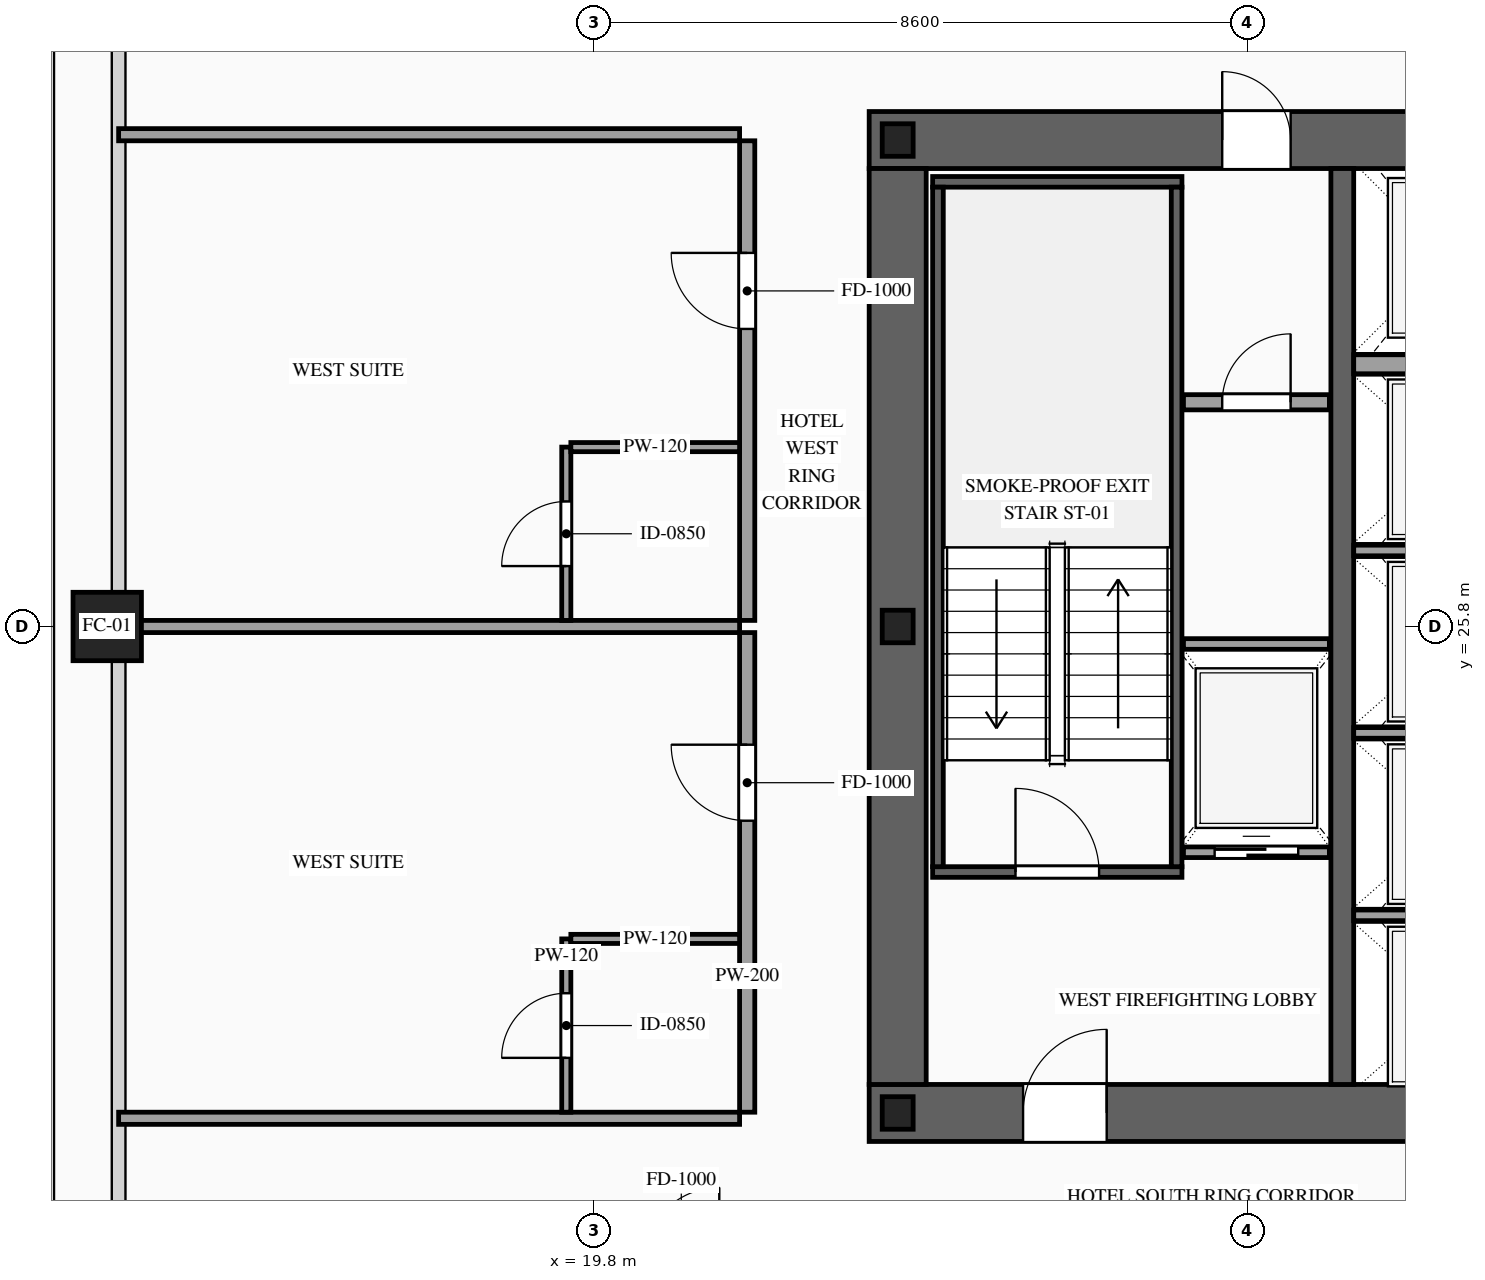
"""IFC4 building model, lengths in metres.
Left out: names, types, materials, properties, quantities, classifications, styles, units other than length and angle.
Written with IfcOpenShell. Run it as: python <this file> out.ifc"""

import sys

from ifc_helpers import new_model, si_unit, direction, frame, frame_2d, origin, origin_2d, place, context, subcontext, project, spatial, rectangle, hollow_rectangle, i_section, extrude, source, transform, mapped, element, fill, save


model = new_model("IFC4")
c1 = context("Model", 3, precision=1e-05, world=origin(), true_north=direction((0.0, 1.0)))
c2 = subcontext(c1, "Body", "Model", "MODEL_VIEW")
j1 = project(units=[si_unit("LENGTHUNIT", "METRE"), si_unit("PLANEANGLEUNIT", "RADIAN")], contexts=[c1])
p1 = place(None, origin())
s1 = spatial("IfcSite", under=j1, at=p1, CompositionType="ELEMENT")
p2 = place(p1, origin())
s2 = spatial("IfcBuilding", under=s1, at=p2, CompositionType="ELEMENT")
p3 = place(p2, frame((0.0, 0.0, 97.4)))
s3 = spatial("IfcBuildingStorey", under=s2, at=p3, CompositionType="ELEMENT", Elevation=97.4)
p4 = place(p3, frame((23.425, 19.4, 0.0), z_axis=(0.0, 0.0, 1.0), x_axis=(1.0, 0.0, 0.0)))
e1 = element("IfcWall", 1, at=p4, inside=s3, PredefinedType="SHEAR", context=c2, shape_type="SweptSolid", body=[
    extrude(rectangle(XDim=27.15, YDim=0.75, at=frame_2d((13.575, 0.0))), origin(), (0.0, 0.0, 1.0), 3.6),
])
p5 = place(p4, frame((2.025, 0.0, 0.0)))
e2 = element("IfcOpeningElement", 2, at=p5, cuts=e1, PredefinedType="OPENING", context=c2, shape_type="SweptSolid", body=[
    extrude(rectangle(XDim=1.1, YDim=2.2, at=frame_2d((0.55, 1.1))), frame((0.0, 0.39, 0.0), z_axis=(0.0, -1.0, 0.0), x_axis=(1.0, 0.0, 0.0)), (0.0, 0.0, 1.0), 0.78),
])
p6 = place(p4, frame((9.925, 0.0, 0.0)))
e3 = element("IfcOpeningElement", 3, at=p6, cuts=e1, PredefinedType="OPENING", context=c2, shape_type="SweptSolid", body=[
    extrude(rectangle(XDim=1.1, YDim=2.2, at=frame_2d((0.55, 1.1))), frame((0.0, 0.39, 0.0), z_axis=(0.0, -1.0, 0.0), x_axis=(1.0, 0.0, 0.0)), (0.0, 0.0, 1.0), 0.78),
])
p7 = place(p4, frame((23.125, 0.0, 0.0)))
e4 = element("IfcOpeningElement", 4, at=p7, cuts=e1, PredefinedType="OPENING", context=c2, shape_type="SweptSolid", body=[
    extrude(rectangle(XDim=1.1, YDim=2.2, at=frame_2d((0.55, 1.1))), frame((0.0, 0.39, 0.0), z_axis=(0.0, -1.0, 0.0), x_axis=(1.0, 0.0, 0.0)), (0.0, 0.0, 1.0), 0.78),
])
p8 = place(p4, frame((19.745, 0.0, 0.0)))
e5 = element("IfcOpeningElement", 5, at=p8, cuts=e1, PredefinedType="OPENING", context=c2, shape_type="SweptSolid", body=[
    extrude(rectangle(XDim=0.9, YDim=2.15, at=frame_2d((0.45, 1.075))), frame((0.0, 0.39, 0.0), z_axis=(0.0, -1.0, 0.0), x_axis=(1.0, 0.0, 0.0)), (0.0, 0.0, 1.0), 0.78),
])
p9 = place(p4, frame((18.305, 0.0, 0.0)))
e6 = element("IfcOpeningElement", 6, at=p9, cuts=e1, PredefinedType="OPENING", context=c2, shape_type="SweptSolid", body=[
    extrude(rectangle(XDim=0.9, YDim=2.15, at=frame_2d((0.45, 1.075))), frame((0.0, 0.39, 0.0), z_axis=(0.0, -1.0, 0.0), x_axis=(1.0, 0.0, 0.0)), (0.0, 0.0, 1.0), 0.78),
])
p10 = place(p3, frame((23.425, 32.2, 0.0), z_axis=(0.0, 0.0, 1.0), x_axis=(1.0, 0.0, 0.0)))
e7 = element("IfcWall", 7, at=p10, inside=s3, PredefinedType="SHEAR", context=c2, shape_type="SweptSolid", body=[
    extrude(rectangle(XDim=27.15, YDim=0.75, at=frame_2d((13.575, 0.0))), origin(), (0.0, 0.0, 1.0), 3.6),
])
p11 = place(p10, frame((4.645, 0.0, 0.0)))
e8 = element("IfcOpeningElement", 8, at=p11, cuts=e7, PredefinedType="OPENING", context=c2, shape_type="SweptSolid", body=[
    extrude(rectangle(XDim=0.9, YDim=2.15, at=frame_2d((0.45, 1.075))), frame((0.0, 0.39, 0.0), z_axis=(0.0, -1.0, 0.0), x_axis=(1.0, 0.0, 0.0)), (0.0, 0.0, 1.0), 0.78),
])
p12 = place(p10, frame((9.925, 0.0, 0.0)))
e9 = element("IfcOpeningElement", 9, at=p12, cuts=e7, PredefinedType="OPENING", context=c2, shape_type="SweptSolid", body=[
    extrude(rectangle(XDim=1.1, YDim=2.2, at=frame_2d((0.55, 1.1))), frame((0.0, 0.39, 0.0), z_axis=(0.0, -1.0, 0.0), x_axis=(1.0, 0.0, 0.0)), (0.0, 0.0, 1.0), 0.78),
])
p13 = place(p10, frame((15.775, 0.0, 0.0)))
e10 = element("IfcOpeningElement", 10, at=p13, cuts=e7, PredefinedType="OPENING", context=c2, shape_type="SweptSolid", body=[
    extrude(rectangle(XDim=1.1, YDim=2.2, at=frame_2d((0.55, 1.1))), frame((0.0, 0.39, 0.0), z_axis=(0.0, -1.0, 0.0), x_axis=(1.0, 0.0, 0.0)), (0.0, 0.0, 1.0), 0.78),
])
p14 = place(p10, frame((18.975, 0.0, 0.0)))
e11 = element("IfcOpeningElement", 11, at=p14, cuts=e7, PredefinedType="OPENING", context=c2, shape_type="SweptSolid", body=[
    extrude(rectangle(XDim=0.9, YDim=2.15, at=frame_2d((0.45, 1.075))), frame((0.0, 0.39, 0.0), z_axis=(0.0, -1.0, 0.0), x_axis=(1.0, 0.0, 0.0)), (0.0, 0.0, 1.0), 0.78),
])
m1 = source(origin(), c2, "Body", "SweptSolid", [
    extrude(rectangle(XDim=12.05, YDim=0.75, at=frame_2d((6.025, 0.0))), origin(), (0.0, 0.0, 1.0), 3.6),
])
p15 = place(p3, frame((23.8, 19.775, 0.0), z_axis=(0.0, 0.0, 1.0), x_axis=(0.0, 1.0, 0.0)))
e12 = element("IfcWall", 12, at=p15, inside=s3, PredefinedType="SHEAR", context=c2, shape_type="MappedRepresentation", body=[
    mapped(m1, transform((0.0, 0.0, 0.0), scale=1.0)),
])
m2 = source(origin(), c2, "Body", "SweptSolid", [
    extrude(rectangle(XDim=12.05, YDim=0.3, at=frame_2d((6.025, 0.0))), origin(), (0.0, 0.0, 1.0), 3.6),
])
p16 = place(p3, frame((29.65, 19.775, 0.0), z_axis=(0.0, 0.0, 1.0), x_axis=(0.0, 1.0, 0.0)))
e13 = element("IfcWall", 13, at=p16, inside=s3, PredefinedType="SOLIDWALL", context=c2, shape_type="MappedRepresentation", body=[
    mapped(m2, transform((0.0, 0.0, 0.0), scale=1.0)),
])
m3 = source(origin(), c2, "Body", "SweptSolid", [
    extrude(i_section(OverallWidth=0.407, OverallDepth=0.428, WebThickness=0.02, FlangeThickness=0.035, at=origin_2d()), origin(), (0.0, 0.0, 1.0), 3.6),
])
for number, where, z_axis, x_axis in (
    (14, (23.8, 19.4, 0.0), (0.0, 0.0, 1.0), (1.0, 0.0, 0.0)),
    (15, (23.8, 25.8, 0.0), (0.0, 0.0, 1.0), (1.0, 0.0, 0.0)),
    (16, (23.8, 32.2, 0.0), (0.0, 0.0, 1.0), (1.0, 0.0, 0.0)),
):
    element("IfcColumn", number, at=place(p3, frame(where, z_axis=z_axis, x_axis=x_axis)), inside=s3, PredefinedType="COLUMN", context=c2, shape_type="MappedRepresentation", body=[
        mapped(m3, transform((0.0, 0.0, 0.0), scale=1.0)),
    ])
m4 = source(origin(), c2, "Body", "SweptSolid", [
    extrude(hollow_rectangle(XDim=0.9, YDim=0.9, WallThickness=0.042, at=origin_2d()), origin(), (0.0, 0.0, 1.0), 3.6),
])
p17 = place(p3, frame((13.4, 25.8, 0.0), z_axis=(0.0, 0.0, 1.0), x_axis=(1.0, 0.0, 0.0)))
e17 = element("IfcColumn", 17, at=p17, inside=s3, PredefinedType="COLUMN", context=c2, shape_type="MappedRepresentation", body=[
    mapped(m4, transform((0.0, 0.0, 0.0), scale=1.0)),
])
p18 = place(p3, frame((27.56, 22.83, 0.0), z_axis=(0.0, 0.0, 1.0), x_axis=(1.0, 0.0, 0.0)))
e18 = element("IfcWall", 18, at=p18, inside=s3, PredefinedType="SOLIDWALL", context=c2, shape_type="SweptSolid", body=[
    extrude(rectangle(XDim=1.92, YDim=0.14, at=frame_2d((0.96, 0.0))), origin(), (0.0, 0.0, 1.0), 3.38),
])
p19 = place(p18, frame((0.41, 0.0, 0.0)))
e19 = element("IfcOpeningElement", 19, at=p19, cuts=e18, PredefinedType="OPENING", context=c2, shape_type="SweptSolid", body=[
    extrude(rectangle(XDim=1.1, YDim=2.2, at=frame_2d((0.55, 1.1))), frame((0.0, 0.085, 0.0), z_axis=(0.0, -1.0, 0.0), x_axis=(1.0, 0.0, 0.0)), (0.0, 0.0, 1.0), 0.17),
])
m5 = source(origin(), c2, "Body", "SweptSolid", [
    extrude(rectangle(XDim=1.92, YDim=0.14, at=frame_2d((0.96, 0.0))), origin(), (0.0, 0.0, 1.0), 3.38),
])
p20 = place(p3, frame((27.56, 25.57, 0.0), z_axis=(0.0, 0.0, 1.0), x_axis=(1.0, 0.0, 0.0)))
e20 = element("IfcWall", 20, at=p20, inside=s3, PredefinedType="SOLIDWALL", context=c2, shape_type="MappedRepresentation", body=[
    mapped(m5, transform((0.0, 0.0, 0.0), scale=1.0)),
])
m6 = source(origin(), c2, "Body", "SweptSolid", [
    extrude(rectangle(XDim=2.5, YDim=0.14, at=frame_2d((1.25, 0.0))), origin(), (0.0, 0.0, 1.0), 3.38),
])
for number, where, z_axis, x_axis in (
    (21, (29.8, 22.0, 0.0), (0.0, 0.0, 1.0), (1.0, 0.0, 0.0)),
    (22, (29.8, 24.4, 0.0), (0.0, 0.0, 1.0), (1.0, 0.0, 0.0)),
    (23, (29.8, 26.8, 0.0), (0.0, 0.0, 1.0), (1.0, 0.0, 0.0)),
):
    element("IfcWall", number, at=place(p3, frame(where, z_axis=z_axis, x_axis=x_axis)), inside=s3, PredefinedType="SOLIDWALL", context=c2, shape_type="MappedRepresentation", body=[
        mapped(m6, transform((0.0, 0.0, 0.0), scale=1.0)),
    ])
m7 = source(origin(), c2, "Body", "SweptSolid", [
    extrude(rectangle(XDim=2.5, YDim=0.25, at=frame_2d((1.25, 0.0))), origin(), (0.0, 0.0, 1.0), 3.38),
])
p21 = place(p3, frame((29.8, 29.25, 0.0), z_axis=(0.0, 0.0, 1.0), x_axis=(1.0, 0.0, 0.0)))
e24 = element("IfcWall", 24, at=p21, inside=s3, PredefinedType="SOLIDWALL", context=c2, shape_type="MappedRepresentation", body=[
    mapped(m7, transform((0.0, 0.0, 0.0), scale=1.0)),
])
p22 = place(p3, frame((24.26, 22.57, 0.0), z_axis=(0.0, 0.0, 1.0), x_axis=(1.0, 0.0, 0.0)))
e25 = element("IfcWall", 25, at=p22, inside=s3, PredefinedType="SOLIDWALL", context=c2, shape_type="SweptSolid", body=[
    extrude(rectangle(XDim=3.28, YDim=0.14, at=frame_2d((1.64, 0.0))), origin(), (0.0, 0.0, 1.0), 3.38),
])
p23 = place(p22, frame((1.09, 0.0, 0.0)))
e26 = element("IfcOpeningElement", 26, at=p23, cuts=e25, PredefinedType="OPENING", context=c2, shape_type="SweptSolid", body=[
    extrude(rectangle(XDim=1.1, YDim=2.2, at=frame_2d((0.55, 1.1))), frame((0.0, 0.085, 0.0), z_axis=(0.0, -1.0, 0.0), x_axis=(1.0, 0.0, 0.0)), (0.0, 0.0, 1.0), 0.17),
])
m8 = source(origin(), c2, "Body", "SweptSolid", [
    extrude(rectangle(XDim=3.28, YDim=0.14, at=frame_2d((1.64, 0.0))), origin(), (0.0, 0.0, 1.0), 3.38),
])
p24 = place(p3, frame((24.26, 31.65, 0.0), z_axis=(0.0, 0.0, 1.0), x_axis=(1.0, 0.0, 0.0)))
e27 = element("IfcWall", 27, at=p24, inside=s3, PredefinedType="SOLIDWALL", context=c2, shape_type="MappedRepresentation", body=[
    mapped(m8, transform((0.0, 0.0, 0.0), scale=1.0)),
])
m9 = source(origin(), c2, "Body", "SweptSolid", [
    extrude(rectangle(XDim=8.94, YDim=0.14, at=frame_2d((4.47, 0.0))), origin(), (0.0, 0.0, 1.0), 3.38),
])
for number, where, z_axis, x_axis in (
    (28, (24.33, 22.64, 0.0), (0.0, 0.0, 1.0), (0.0, 1.0, 0.0)),
    (29, (27.47, 22.64, 0.0), (0.0, 0.0, 1.0), (0.0, 1.0, 0.0)),
):
    element("IfcWall", number, at=place(p3, frame(where, z_axis=z_axis, x_axis=x_axis)), inside=s3, PredefinedType="SOLIDWALL", context=c2, shape_type="MappedRepresentation", body=[
        mapped(m9, transform((0.0, 0.0, 0.0), scale=1.0)),
    ])
p25 = place(p3, frame((27.56, 28.75, 0.0), z_axis=(0.0, 0.0, 1.0), x_axis=(1.0, 0.0, 0.0)))
e30 = element("IfcWall", 30, at=p25, inside=s3, PredefinedType="PARTITIONING", context=c2, shape_type="SweptSolid", body=[
    extrude(rectangle(XDim=1.92, YDim=0.2, at=frame_2d((0.96, 0.0))), origin(), (0.0, 0.0, 1.0), 3.38),
])
p26 = place(p25, frame((0.51, 0.0, 0.0)))
e31 = element("IfcOpeningElement", 31, at=p26, cuts=e30, PredefinedType="OPENING", context=c2, shape_type="SweptSolid", body=[
    extrude(rectangle(XDim=0.9, YDim=2.15, at=frame_2d((0.45, 1.075))), frame((0.0, 0.115, 0.0), z_axis=(0.0, -1.0, 0.0), x_axis=(1.0, 0.0, 0.0)), (0.0, 0.0, 1.0), 0.23),
])
p27 = place(p3, frame((21.82, 19.41, 0.0), z_axis=(0.0, 0.0, 1.0), x_axis=(0.0, 1.0, 0.0)))
e32 = element("IfcWall", 32, at=p27, inside=s3, PredefinedType="PARTITIONING", context=c2, shape_type="SweptSolid", body=[
    extrude(rectangle(XDim=6.31, YDim=0.2, at=frame_2d((3.155, 0.0))), origin(), (0.0, 0.0, 1.0), 3.38),
])
p28 = place(p27, frame((3.835, 0.0, 0.0)))
e33 = element("IfcOpeningElement", 33, at=p28, cuts=e32, PredefinedType="OPENING", context=c2, shape_type="SweptSolid", body=[
    extrude(rectangle(XDim=1.0, YDim=2.2, at=frame_2d((0.5, 1.1))), frame((0.0, 0.115, 0.0), z_axis=(0.0, -1.0, 0.0), x_axis=(1.0, 0.0, 0.0)), (0.0, 0.0, 1.0), 0.23),
])
m10 = source(origin(), c2, "Body", "SweptSolid", [
    extrude(rectangle(XDim=8.17, YDim=0.16, at=frame_2d((4.085, 0.0))), origin(), (0.0, 0.0, 1.0), 2.675),
])
p29 = place(p3, frame((13.55, 25.8, 0.0), z_axis=(0.0, 0.0, 1.0), x_axis=(1.0, 0.0, 0.0)))
e34 = element("IfcWall", 34, at=p29, inside=s3, PredefinedType="PARTITIONING", context=c2, shape_type="MappedRepresentation", body=[
    mapped(m10, transform((0.0, 0.0, 0.0), scale=1.0)),
])
m11 = source(origin(), c2, "Body", "SweptSolid", [
    extrude(rectangle(XDim=8.17, YDim=0.16, at=frame_2d((4.085, 0.0))), origin(), (0.0, 0.0, 1.0), 2.875),
])
p30 = place(p3, frame((13.55, 19.33, 0.0), z_axis=(0.0, 0.0, 1.0), x_axis=(1.0, 0.0, 0.0)))
e35 = element("IfcWall", 35, at=p30, inside=s3, PredefinedType="PARTITIONING", context=c2, shape_type="MappedRepresentation", body=[
    mapped(m11, transform((0.0, 0.0, 0.0), scale=1.0)),
])
p31 = place(p3, frame((19.44, 19.41, 0.0), z_axis=(0.0, 0.0, 1.0), x_axis=(0.0, 1.0, 0.0)))
e36 = element("IfcWall", 36, at=p31, inside=s3, PredefinedType="PARTITIONING", context=c2, shape_type="SweptSolid", body=[
    extrude(rectangle(XDim=2.28, YDim=0.12, at=frame_2d((1.14, 0.0))), origin(), (0.0, 0.0, 1.0), 3.38),
])
p32 = place(p31, frame((0.715, 0.0, 0.0)))
e37 = element("IfcOpeningElement", 37, at=p32, cuts=e36, PredefinedType="OPENING", context=c2, shape_type="SweptSolid", body=[
    extrude(rectangle(XDim=0.85, YDim=2.1, at=frame_2d((0.425, 1.05))), frame((0.0, 0.075, 0.0), z_axis=(0.0, -1.0, 0.0), x_axis=(1.0, 0.0, 0.0)), (0.0, 0.0, 1.0), 0.15),
])
m12 = source(origin(), c2, "Body", "SweptSolid", [
    extrude(rectangle(XDim=2.22, YDim=0.12, at=frame_2d((1.11, 0.0))), origin(), (0.0, 0.0, 1.0), 3.38),
])
p33 = place(p3, frame((19.5, 21.69, 0.0), z_axis=(0.0, 0.0, 1.0), x_axis=(1.0, 0.0, 0.0)))
e38 = element("IfcWall", 38, at=p33, inside=s3, PredefinedType="PARTITIONING", context=c2, shape_type="MappedRepresentation", body=[
    mapped(m12, transform((0.0, 0.0, 0.0), scale=1.0)),
])
p34 = place(p3, frame((21.82, 25.88, 0.0), z_axis=(0.0, 0.0, 1.0), x_axis=(0.0, 1.0, 0.0)))
e39 = element("IfcWall", 39, at=p34, inside=s3, PredefinedType="PARTITIONING", context=c2, shape_type="SweptSolid", body=[
    extrude(rectangle(XDim=6.31, YDim=0.2, at=frame_2d((3.155, 0.0))), origin(), (0.0, 0.0, 1.0), 3.38),
])
p35 = place(p34, frame((3.835, 0.0, 0.0)))
e40 = element("IfcOpeningElement", 40, at=p35, cuts=e39, PredefinedType="OPENING", context=c2, shape_type="SweptSolid", body=[
    extrude(rectangle(XDim=1.0, YDim=2.2, at=frame_2d((0.5, 1.1))), frame((0.0, 0.115, 0.0), z_axis=(0.0, -1.0, 0.0), x_axis=(1.0, 0.0, 0.0)), (0.0, 0.0, 1.0), 0.23),
])
p36 = place(p3, frame((13.55, 32.27, 0.0), z_axis=(0.0, 0.0, 1.0), x_axis=(1.0, 0.0, 0.0)))
e41 = element("IfcWall", 41, at=p36, inside=s3, PredefinedType="PARTITIONING", context=c2, shape_type="MappedRepresentation", body=[
    mapped(m11, transform((0.0, 0.0, 0.0), scale=1.0)),
])
p37 = place(p3, frame((19.44, 25.88, 0.0), z_axis=(0.0, 0.0, 1.0), x_axis=(0.0, 1.0, 0.0)))
e42 = element("IfcWall", 42, at=p37, inside=s3, PredefinedType="PARTITIONING", context=c2, shape_type="SweptSolid", body=[
    extrude(rectangle(XDim=2.28, YDim=0.12, at=frame_2d((1.14, 0.0))), origin(), (0.0, 0.0, 1.0), 3.38),
])
p38 = place(p37, frame((0.715, 0.0, 0.0)))
e43 = element("IfcOpeningElement", 43, at=p38, cuts=e42, PredefinedType="OPENING", context=c2, shape_type="SweptSolid", body=[
    extrude(rectangle(XDim=0.85, YDim=2.1, at=frame_2d((0.425, 1.05))), frame((0.0, 0.075, 0.0), z_axis=(0.0, -1.0, 0.0), x_axis=(1.0, 0.0, 0.0)), (0.0, 0.0, 1.0), 0.15),
])
p39 = place(p3, frame((19.5, 28.16, 0.0), z_axis=(0.0, 0.0, 1.0), x_axis=(1.0, 0.0, 0.0)))
e44 = element("IfcWall", 44, at=p39, inside=s3, PredefinedType="PARTITIONING", context=c2, shape_type="MappedRepresentation", body=[
    mapped(m12, transform((0.0, 0.0, 0.0), scale=1.0)),
])
m13 = source(origin(), c2, "Body", "SweptSolid", [
    extrude(rectangle(XDim=1.1, YDim=2.2, at=frame_2d((0.55, 1.1))), frame((0.0, 0.025, 0.0), z_axis=(0.0, -1.0, 0.0), x_axis=(1.0, 0.0, 0.0)), (0.0, 0.0, 1.0), 0.05),
])
p40 = place(p19, origin())
e45 = element("IfcDoor", 45, at=p40, inside=s3, OperationType="SLIDING_TO_LEFT", PredefinedType="DOOR", context=c2, shape_type="MappedRepresentation", body=[
    mapped(m13, transform((0.0, 0.0, 0.0), scale=1.0)),
])
fill(e19, e45)
m14 = source(origin(), c2, "Body", "SweptSolid", [
    extrude(rectangle(XDim=1.1, YDim=2.2, at=frame_2d((0.55, 1.1))), frame((0.0, 0.025, 0.0), z_axis=(0.0, -1.0, 0.0), x_axis=(1.0, 0.0, 0.0)), (0.0, 0.0, 1.0), 0.05),
])
p41 = place(p23, origin())
e46 = element("IfcDoor", 46, at=p41, inside=s3, OperationType="SINGLE_SWING_LEFT", PredefinedType="DOOR", context=c2, shape_type="MappedRepresentation", body=[
    mapped(m14, transform((0.0, 0.0, 0.0), scale=1.0)),
])
fill(e26, e46)
p42 = place(p5, origin())
e47 = element("IfcDoor", 47, at=p42, inside=s3, OperationType="SINGLE_SWING_RIGHT", PredefinedType="DOOR", context=c2, shape_type="MappedRepresentation", body=[
    mapped(m14, transform((0.0, 0.0, 0.0), scale=1.0)),
])
fill(e2, e47)
m15 = source(origin(), c2, "Body", "SweptSolid", [
    extrude(rectangle(XDim=0.9, YDim=2.15, at=frame_2d((0.45, 1.075))), frame((0.0, 0.025, 0.0), z_axis=(0.0, -1.0, 0.0), x_axis=(1.0, 0.0, 0.0)), (0.0, 0.0, 1.0), 0.05),
])
p43 = place(p11, origin())
e48 = element("IfcDoor", 48, at=p43, inside=s3, OperationType="SINGLE_SWING_LEFT", PredefinedType="DOOR", context=c2, shape_type="MappedRepresentation", body=[
    mapped(m15, transform((0.0, 0.0, 0.0), scale=1.0)),
])
fill(e8, e48)
p44 = place(p26, origin())
e49 = element("IfcDoor", 49, at=p44, inside=s3, OperationType="SINGLE_SWING_RIGHT", PredefinedType="DOOR", context=c2, shape_type="MappedRepresentation", body=[
    mapped(m15, transform((0.0, 0.0, 0.0), scale=1.0)),
])
fill(e31, e49)
m16 = source(origin(), c2, "Body", "SweptSolid", [
    extrude(rectangle(XDim=1.0, YDim=2.2, at=frame_2d((0.5, 1.1))), frame((0.0, 0.025, 0.0), z_axis=(0.0, -1.0, 0.0), x_axis=(1.0, 0.0, 0.0)), (0.0, 0.0, 1.0), 0.05),
])
p45 = place(p28, origin())
e50 = element("IfcDoor", 50, at=p45, inside=s3, OperationType="SINGLE_SWING_RIGHT", PredefinedType="DOOR", context=c2, shape_type="MappedRepresentation", body=[
    mapped(m16, transform((0.0, 0.0, 0.0), scale=1.0)),
])
fill(e33, e50)
m17 = source(origin(), c2, "Body", "SweptSolid", [
    extrude(rectangle(XDim=0.85, YDim=2.1, at=frame_2d((0.425, 1.05))), frame((0.0, 0.025, 0.0), z_axis=(0.0, -1.0, 0.0), x_axis=(1.0, 0.0, 0.0)), (0.0, 0.0, 1.0), 0.05),
])
p46 = place(p32, origin())
e51 = element("IfcDoor", 51, at=p46, inside=s3, OperationType="SINGLE_SWING_LEFT", PredefinedType="DOOR", context=c2, shape_type="MappedRepresentation", body=[
    mapped(m17, transform((0.0, 0.0, 0.0), scale=1.0)),
])
fill(e37, e51)
p47 = place(p35, origin())
e52 = element("IfcDoor", 52, at=p47, inside=s3, OperationType="SINGLE_SWING_RIGHT", PredefinedType="DOOR", context=c2, shape_type="MappedRepresentation", body=[
    mapped(m16, transform((0.0, 0.0, 0.0), scale=1.0)),
])
fill(e40, e52)
p48 = place(p38, origin())
e53 = element("IfcDoor", 53, at=p48, inside=s3, OperationType="SINGLE_SWING_LEFT", PredefinedType="DOOR", context=c2, shape_type="MappedRepresentation", body=[
    mapped(m17, transform((0.0, 0.0, 0.0), scale=1.0)),
])
fill(e43, e53)
save(model, sys.argv[1])
